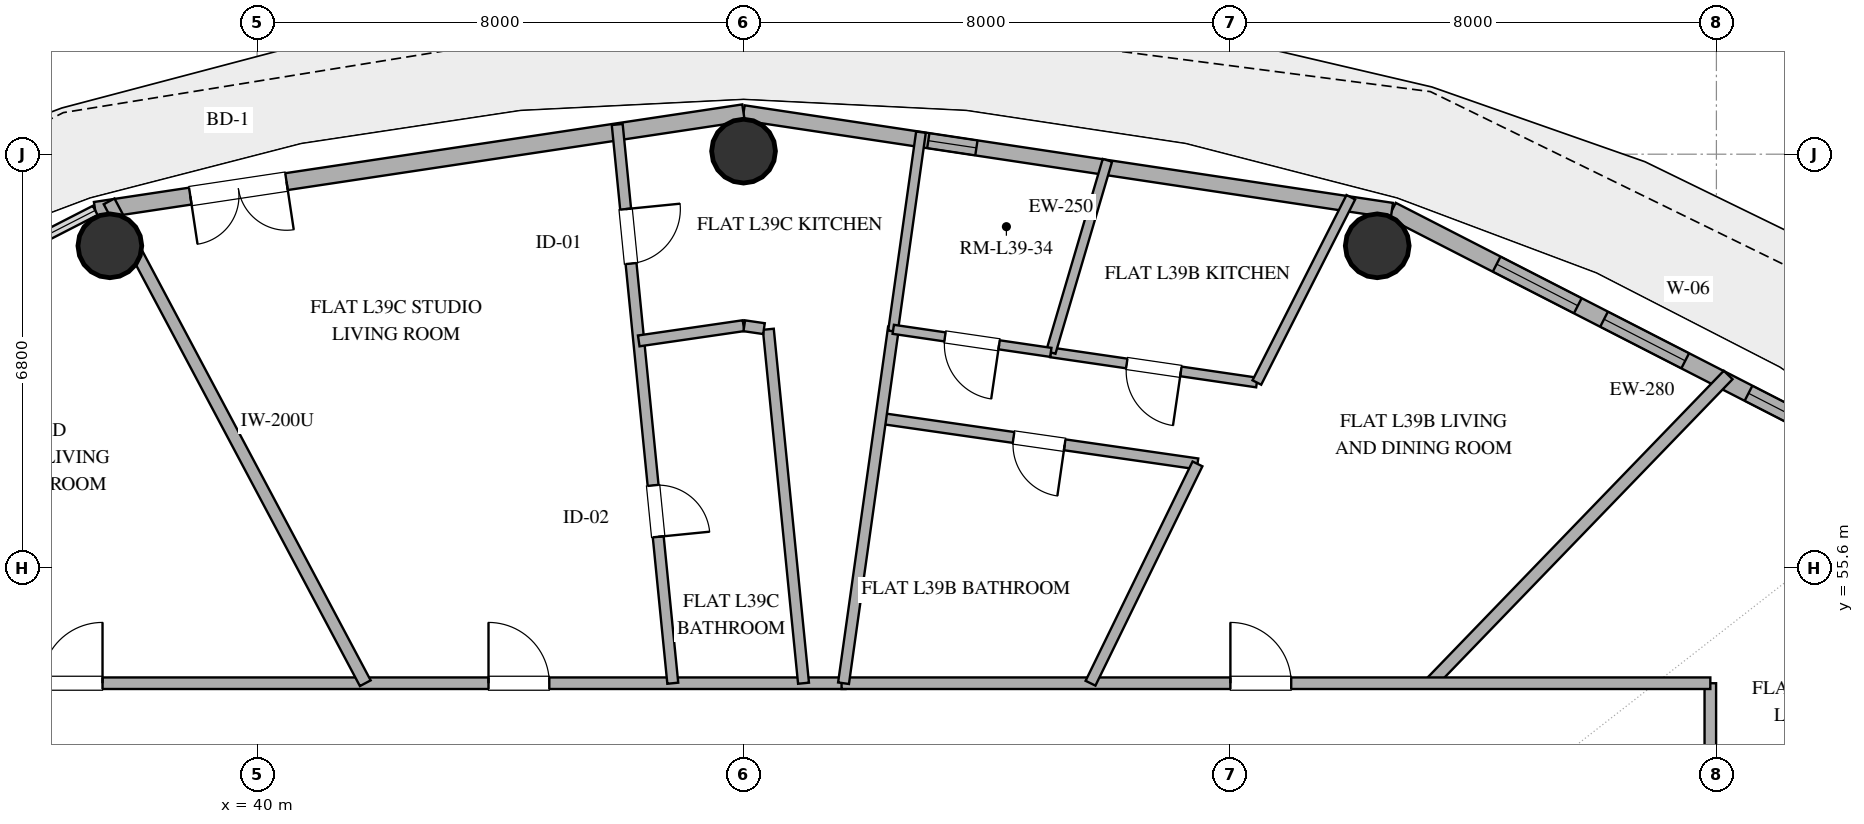
"""IFC4 building model, lengths in metres.
Left out: names, types, materials, properties, quantities, classifications, styles, units other than length and angle.
Written with IfcOpenShell. Run it as: python <this file> out.ifc"""

import sys

from ifc_helpers import new_model, si_unit, direction, frame, frame_2d, origin, origin_2d, place, context, subcontext, project, spatial, rectangle, hollow_circle, extrude, element, fill, save


model = new_model("IFC4")
c1 = context("Model", 3, precision=1e-05, world=origin(), true_north=direction((0.0, 1.0)))
c2 = subcontext(c1, "Body", "Model", "MODEL_VIEW")
j1 = project(units=[si_unit("LENGTHUNIT", "METRE"), si_unit("PLANEANGLEUNIT", "RADIAN")], contexts=[c1])
p1 = place(None, origin())
s1 = spatial("IfcSite", under=j1, at=p1, CompositionType="ELEMENT")
p2 = place(p1, origin())
s2 = spatial("IfcBuilding", under=s1, at=p2, CompositionType="ELEMENT")
p3 = place(p2, frame((0.0, 0.0, 157.8)))
s3 = spatial("IfcBuildingStorey", under=s2, at=p3, CompositionType="ELEMENT", Elevation=157.8)
for number, where, z_axis, x_axis in (
    (1, (58.422, 60.893, 0.0), (0.0, 0.0, 1.0), (1.0, 0.0, 0.0)),
    (2, (48.0, 62.45, 0.0), (0.0, 0.0, 1.0), (1.0, 0.0, 0.0)),
    (3, (37.578, 60.893, 0.0), (0.0, 0.0, 1.0), (1.0, 0.0, 0.0)),
):
    element("IfcColumn", number, at=place(p3, frame(where, z_axis=z_axis, x_axis=x_axis)), inside=s3, PredefinedType="COLUMN", context=c2, shape_type="SweptSolid", body=[
        extrude(hollow_circle(Radius=0.525, WallThickness=0.028, at=origin_2d()), origin(), (0.0, 0.0, 1.0), 3.38),
    ])
p4 = place(p3, frame((67.576, 56.906, 0.0), z_axis=(0.0, 0.0, 1.0), x_axis=(-0.889872523182, 0.456209263919, 0.0)))
e4 = element("IfcWall", 4, at=p4, inside=s3, PredefinedType="SOLIDWALL", context=c2, shape_type="SweptSolid", body=[
    extrude(rectangle(XDim=10.016, YDim=0.28, at=frame_2d((5.008, 0.0))), origin(), (0.0, 0.0, 1.0), 3.38),
])
p5 = place(p4, frame((1.775, 0.0, 0.85)))
e5 = element("IfcOpeningElement", 5, at=p5, cuts=e4, PredefinedType="OPENING", context=c2, shape_type="SweptSolid", body=[
    extrude(rectangle(XDim=1.65, YDim=2.0, at=frame_2d((0.825, 1.0))), frame((0.0, 0.15, 0.0), z_axis=(0.0, -1.0, 0.0), x_axis=(1.0, 0.0, 0.0)), (0.0, 0.0, 1.0), 0.3),
])
p6 = place(p4, frame((4.595, 0.0, 0.85)))
e6 = element("IfcOpeningElement", 6, at=p6, cuts=e4, PredefinedType="OPENING", context=c2, shape_type="SweptSolid", body=[
    extrude(rectangle(XDim=1.5, YDim=2.0, at=frame_2d((0.75, 1.0))), frame((0.0, 0.15, 0.0), z_axis=(0.0, -1.0, 0.0), x_axis=(1.0, 0.0, 0.0)), (0.0, 0.0, 1.0), 0.3),
])
p7 = place(p4, frame((6.58, 0.0, 0.85)))
e7 = element("IfcOpeningElement", 7, at=p7, cuts=e4, PredefinedType="OPENING", context=c2, shape_type="SweptSolid", body=[
    extrude(rectangle(XDim=1.5, YDim=2.0, at=frame_2d((0.75, 1.0))), frame((0.0, 0.15, 0.0), z_axis=(0.0, -1.0, 0.0), x_axis=(1.0, 0.0, 0.0)), (0.0, 0.0, 1.0), 0.3),
])
p8 = place(p3, frame((58.663, 61.475, 0.0), z_axis=(0.0, 0.0, 1.0), x_axis=(-0.988863993413, 0.148822049884, 0.0)))
e8 = element("IfcWall", 8, at=p8, inside=s3, PredefinedType="SOLIDWALL", context=c2, shape_type="SweptSolid", body=[
    extrude(rectangle(XDim=10.783, YDim=0.25, at=frame_2d((5.392, 0.0))), origin(), (0.0, 0.0, 1.0), 3.38),
])
p9 = place(p8, frame((6.91, 0.0, 1.54)))
e9 = element("IfcOpeningElement", 9, at=p9, cuts=e8, PredefinedType="OPENING", context=c2, shape_type="SweptSolid", body=[
    extrude(rectangle(XDim=0.8, YDim=1.0, at=frame_2d((0.4, 0.5))), frame((0.0, 0.135, 0.0), z_axis=(0.0, -1.0, 0.0), x_axis=(1.0, 0.0, 0.0)), (0.0, 0.0, 1.0), 0.27),
])
p10 = place(p3, frame((48.0, 63.08, 0.0), z_axis=(0.0, 0.0, 1.0), x_axis=(-0.988863993413, -0.148822049884, 0.0)))
e10 = element("IfcWall", 10, at=p10, inside=s3, PredefinedType="SOLIDWALL", context=c2, shape_type="SweptSolid", body=[
    extrude(rectangle(XDim=10.783, YDim=0.28, at=frame_2d((5.392, 0.0))), origin(), (0.0, 0.0, 1.0), 3.38),
])
p11 = place(p10, frame((7.601, 0.0, 0.0)))
e11 = element("IfcOpeningElement", 11, at=p11, cuts=e10, PredefinedType="OPENING", context=c2, shape_type="SweptSolid", body=[
    extrude(rectangle(XDim=1.6, YDim=2.25, at=frame_2d((0.8, 1.125))), frame((0.0, 0.15, 0.0), z_axis=(0.0, -1.0, 0.0), x_axis=(1.0, 0.0, 0.0)), (0.0, 0.0, 1.0), 0.3),
])
p12 = place(p3, frame((32.1, 53.7, 0.0), z_axis=(0.0, 0.0, 1.0), x_axis=(1.0, 0.0, 0.0)))
e12 = element("IfcWall", 12, at=p12, inside=s3, PredefinedType="PARTITIONING", context=c2, shape_type="SweptSolid", body=[
    extrude(rectangle(XDim=17.576, YDim=0.19, at=frame_2d((8.788, 0.0))), origin(), (0.0, 0.0, 1.0), 2.74),
])
p13 = place(p12, frame((4.358, 0.0, 0.0)))
e13 = element("IfcOpeningElement", 13, at=p13, cuts=e12, PredefinedType="OPENING", context=c2, shape_type="SweptSolid", body=[
    extrude(rectangle(XDim=1.0, YDim=2.2, at=frame_2d((0.5, 1.1))), frame((0.0, 0.105, 0.0), z_axis=(0.0, -1.0, 0.0), x_axis=(1.0, 0.0, 0.0)), (0.0, 0.0, 1.0), 0.21),
])
p14 = place(p12, frame((11.706, 0.0, 0.0)))
e14 = element("IfcOpeningElement", 14, at=p14, cuts=e12, PredefinedType="OPENING", context=c2, shape_type="SweptSolid", body=[
    extrude(rectangle(XDim=1.0, YDim=2.2, at=frame_2d((0.5, 1.1))), frame((0.0, 0.105, 0.0), z_axis=(0.0, -1.0, 0.0), x_axis=(1.0, 0.0, 0.0)), (0.0, 0.0, 1.0), 0.21),
])
p15 = place(p3, frame((37.566, 61.624, 0.0), z_axis=(0.0, 0.0, 1.0), x_axis=(0.469466796814, -0.882950126955, 0.0)))
e15 = element("IfcWall", 15, at=p15, inside=s3, PredefinedType="PARTITIONING", context=c2, shape_type="SweptSolid", body=[
    extrude(rectangle(XDim=8.975, YDim=0.2, at=frame_2d((4.487, 0.0))), origin(), (0.0, 0.0, 1.0), 2.74),
])
p16 = place(p3, frame((64.194, 58.769, 0.0), z_axis=(0.0, 0.0, 1.0), x_axis=(-0.694647685064, -0.719350118952, 0.0)))
e16 = element("IfcWall", 16, at=p16, inside=s3, PredefinedType="PARTITIONING", context=c2, shape_type="SweptSolid", body=[
    extrude(rectangle(XDim=7.047, YDim=0.2, at=frame_2d((3.523, 0.0))), origin(), (0.0, 0.0, 1.0), 2.74),
])
p17 = place(p3, frame((63.9, 53.7, 0.0), z_axis=(0.0, 0.0, 1.0), x_axis=(0.0, -1.0, 0.0)))
e17 = element("IfcWall", 17, at=p17, inside=s3, PredefinedType="PARTITIONING", context=c2, shape_type="SweptSolid", body=[
    extrude(rectangle(XDim=10.62, YDim=0.19, at=frame_2d((5.31, 0.0))), origin(), (0.0, 0.0, 1.0), 2.74),
])
p18 = place(p17, frame((2.48, 0.0, 0.0)))
e18 = element("IfcOpeningElement", 18, at=p18, cuts=e17, PredefinedType="OPENING", context=c2, shape_type="SweptSolid", body=[
    extrude(rectangle(XDim=1.0, YDim=2.2, at=frame_2d((0.5, 1.1))), frame((0.0, 0.105, 0.0), z_axis=(0.0, -1.0, 0.0), x_axis=(1.0, 0.0, 0.0)), (0.0, 0.0, 1.0), 0.21),
])
p19 = place(p3, frame((48.407, 59.521, 0.0), z_axis=(0.0, 0.0, 1.0), x_axis=(0.098958231484, -0.995091587956, 0.0)))
e19 = element("IfcWall", 19, at=p19, inside=s3, PredefinedType="PLUMBINGWALL", context=c2, shape_type="SweptSolid", body=[
    extrude(rectangle(XDim=5.85, YDim=0.18, at=frame_2d((2.925, 0.0))), origin(), (0.0, 0.0, 1.0), 2.74),
])
p20 = place(p3, frame((45.922, 62.888, 0.0), z_axis=(0.0, 0.0, 1.0), x_axis=(0.098964435759, -0.995090970944, 0.0)))
e20 = element("IfcWall", 20, at=p20, inside=s3, PredefinedType="PLUMBINGWALL", context=c2, shape_type="SweptSolid", body=[
    extrude(rectangle(XDim=9.234, YDim=0.18, at=frame_2d((4.617, 0.0))), origin(), (0.0, 0.0, 1.0), 2.74),
])
p21 = place(p20, frame((5.964, 0.0, 0.0)))
e21 = element("IfcOpeningElement", 21, at=p21, cuts=e20, PredefinedType="OPENING", context=c2, shape_type="SweptSolid", body=[
    extrude(rectangle(XDim=0.85, YDim=2.1, at=frame_2d((0.425, 1.05))), frame((0.0, 0.1, 0.0), z_axis=(0.0, -1.0, 0.0), x_axis=(1.0, 0.0, 0.0)), (0.0, 0.0, 1.0), 0.2),
])
p22 = place(p20, frame((1.398, 0.0, 0.0)))
e22 = element("IfcOpeningElement", 22, at=p22, cuts=e20, PredefinedType="OPENING", context=c2, shape_type="SweptSolid", body=[
    extrude(rectangle(XDim=0.9, YDim=2.1, at=frame_2d((0.45, 1.05))), frame((0.0, 0.1, 0.0), z_axis=(0.0, -1.0, 0.0), x_axis=(1.0, 0.0, 0.0)), (0.0, 0.0, 1.0), 0.2),
])
p23 = place(p3, frame((49.612, 53.7, 0.0), z_axis=(0.0, 0.0, 1.0), x_axis=(1.0, 0.0, 0.0)))
e23 = element("IfcWall", 23, at=p23, inside=s3, PredefinedType="PARTITIONING", context=c2, shape_type="SweptSolid", body=[
    extrude(rectangle(XDim=14.288, YDim=0.19, at=frame_2d((7.144, 0.0))), origin(), (0.0, 0.0, 1.0), 2.74),
])
p24 = place(p23, frame((6.395, 0.0, 0.0)))
e24 = element("IfcOpeningElement", 24, at=p24, cuts=e23, PredefinedType="OPENING", context=c2, shape_type="SweptSolid", body=[
    extrude(rectangle(XDim=1.0, YDim=2.2, at=frame_2d((0.5, 1.1))), frame((0.0, 0.105, 0.0), z_axis=(0.0, -1.0, 0.0), x_axis=(1.0, 0.0, 0.0)), (0.0, 0.0, 1.0), 0.21),
])
p25 = place(p3, frame((55.466, 57.307, 0.0), z_axis=(0.0, 0.0, 1.0), x_axis=(-0.989825713309, 0.142285126674, 0.0)))
e25 = element("IfcWall", 25, at=p25, inside=s3, PredefinedType="PLUMBINGWALL", context=c2, shape_type="SweptSolid", body=[
    extrude(rectangle(XDim=5.262, YDim=0.18, at=frame_2d((2.631, 0.0))), origin(), (0.0, 0.0, 1.0), 2.74),
])
p26 = place(p25, frame((2.206, 0.0, 0.0)))
e26 = element("IfcOpeningElement", 26, at=p26, cuts=e25, PredefinedType="OPENING", context=c2, shape_type="SweptSolid", body=[
    extrude(rectangle(XDim=0.85, YDim=2.1, at=frame_2d((0.425, 1.05))), frame((0.0, 0.1, 0.0), z_axis=(0.0, -1.0, 0.0), x_axis=(1.0, 0.0, 0.0)), (0.0, 0.0, 1.0), 0.2),
])
p27 = place(p3, frame((50.467, 59.552, 0.0), z_axis=(0.0, 0.0, 1.0), x_axis=(-0.139194058732, -0.990265123093, 0.0)))
e27 = element("IfcWall", 27, at=p27, inside=s3, PredefinedType="PLUMBINGWALL", context=c2, shape_type="SweptSolid", body=[
    extrude(rectangle(XDim=5.909, YDim=0.18, at=frame_2d((2.955, 0.0))), origin(), (0.0, 0.0, 1.0), 2.74),
])
p28 = place(p3, frame((53.707, 53.7, 0.0), z_axis=(0.0, 0.0, 1.0), x_axis=(0.438333733087, 0.898812293217, 0.0)))
e28 = element("IfcWall", 28, at=p28, inside=s3, PredefinedType="PLUMBINGWALL", context=c2, shape_type="SweptSolid", body=[
    extrude(rectangle(XDim=4.013, YDim=0.18, at=frame_2d((2.006, 0.0))), origin(), (0.0, 0.0, 1.0), 2.74),
])
p29 = place(p3, frame((56.442, 58.645, 0.0), z_axis=(0.0, 0.0, 1.0), x_axis=(-0.989476501308, 0.144693653483, 0.0)))
e29 = element("IfcWall", 29, at=p29, inside=s3, PredefinedType="PLUMBINGWALL", context=c2, shape_type="SweptSolid", body=[
    extrude(rectangle(XDim=3.425, YDim=0.16, at=frame_2d((1.713, 0.0))), origin(), (0.0, 0.0, 1.0), 2.74),
])
p30 = place(p29, frame((1.263, 0.0, 0.0)))
e30 = element("IfcOpeningElement", 30, at=p30, cuts=e29, PredefinedType="OPENING", context=c2, shape_type="SweptSolid", body=[
    extrude(rectangle(XDim=0.9, YDim=2.1, at=frame_2d((0.45, 1.05))), frame((0.0, 0.09, 0.0), z_axis=(0.0, -1.0, 0.0), x_axis=(1.0, 0.0, 0.0)), (0.0, 0.0, 1.0), 0.18),
])
p31 = place(p3, frame((57.988, 61.692, 0.0), z_axis=(0.0, 0.0, 1.0), x_axis=(-0.452408261564, -0.89181094682, 0.0)))
e31 = element("IfcWall", 31, at=p31, inside=s3, PredefinedType="PLUMBINGWALL", context=c2, shape_type="SweptSolid", body=[
    extrude(rectangle(XDim=3.417, YDim=0.16, at=frame_2d((1.708, 0.0))), origin(), (0.0, 0.0, 1.0), 2.74),
])
p32 = place(p3, frame((50.918, 62.762, 0.0), z_axis=(0.0, 0.0, 1.0), x_axis=(-0.139198258336, -0.990264532777, 0.0)))
e32 = element("IfcWall", 32, at=p32, inside=s3, PredefinedType="PLUMBINGWALL", context=c2, shape_type="SweptSolid", body=[
    extrude(rectangle(XDim=3.306, YDim=0.16, at=frame_2d((1.653, 0.0))), origin(), (0.0, 0.0, 1.0), 2.74),
])
p33 = place(p3, frame((53.053, 59.141, 0.0), z_axis=(0.0, 0.0, 1.0), x_axis=(0.282828521875, 0.959170489128, 0.0)))
e33 = element("IfcWall", 33, at=p33, inside=s3, PredefinedType="PLUMBINGWALL", context=c2, shape_type="SweptSolid", body=[
    extrude(rectangle(XDim=3.293, YDim=0.16, at=frame_2d((1.646, 0.0))), origin(), (0.0, 0.0, 1.0), 2.74),
])
p34 = place(p3, frame((53.053, 59.141, 0.0), z_axis=(0.0, 0.0, 1.0), x_axis=(-0.989458783037, 0.144814766757, 0.0)))
e34 = element("IfcWall", 34, at=p34, inside=s3, PredefinedType="PARTITIONING", context=c2, shape_type="SweptSolid", body=[
    extrude(rectangle(XDim=2.618, YDim=0.15, at=frame_2d((1.309, 0.0))), origin(), (0.0, 0.0, 1.0), 2.74),
])
p35 = place(p34, frame((0.859, 0.0, 0.0)))
e35 = element("IfcOpeningElement", 35, at=p35, cuts=e34, PredefinedType="OPENING", context=c2, shape_type="SweptSolid", body=[
    extrude(rectangle(XDim=0.9, YDim=2.1, at=frame_2d((0.45, 1.05))), frame((0.0, 0.085, 0.0), z_axis=(0.0, -1.0, 0.0), x_axis=(1.0, 0.0, 0.0)), (0.0, 0.0, 1.0), 0.17),
])
p36 = place(p3, frame((46.276, 59.33, 0.0), z_axis=(0.0, 0.0, 1.0), x_axis=(0.989604582355, 0.143815056869, 0.0)))
e36 = element("IfcWall", 36, at=p36, inside=s3, PredefinedType="PLUMBINGWALL", context=c2, shape_type="SweptSolid", body=[
    extrude(rectangle(XDim=1.742, YDim=0.18, at=frame_2d((0.871, 0.0))), origin(), (0.0, 0.0, 1.0), 2.74),
])
p37 = place(p3, frame((48.012, 59.578, 0.0), z_axis=(0.0, 0.0, 1.0), x_axis=(0.989603801202, -0.143820431952, 0.0)))
e37 = element("IfcWall", 37, at=p37, inside=s3, PredefinedType="PLUMBINGWALL", context=c2, shape_type="SweptSolid", body=[
    extrude(rectangle(XDim=0.328, YDim=0.18, at=frame_2d((0.164, 0.0))), origin(), (0.0, 0.0, 1.0), 2.74),
])
p38 = place(p5, origin())
e38 = element("IfcWindow", 38, at=p38, inside=s3, PartitioningType="SINGLE_PANEL", PredefinedType="WINDOW", context=c2, shape_type="SweptSolid", body=[
    extrude(rectangle(XDim=1.65, YDim=2.0, at=frame_2d((0.825, 1.0))), frame((0.0, 0.03, 0.0), z_axis=(0.0, -1.0, 0.0), x_axis=(1.0, 0.0, 0.0)), (0.0, 0.0, 1.0), 0.06),
])
fill(e5, e38)
p39 = place(p6, origin())
e39 = element("IfcWindow", 39, at=p39, inside=s3, PartitioningType="SINGLE_PANEL", PredefinedType="WINDOW", context=c2, shape_type="SweptSolid", body=[
    extrude(rectangle(XDim=1.5, YDim=2.0, at=frame_2d((0.75, 1.0))), frame((0.0, 0.03, 0.0), z_axis=(0.0, -1.0, 0.0), x_axis=(1.0, 0.0, 0.0)), (0.0, 0.0, 1.0), 0.06),
])
fill(e6, e39)
p40 = place(p7, origin())
e40 = element("IfcWindow", 40, at=p40, inside=s3, PartitioningType="SINGLE_PANEL", PredefinedType="WINDOW", context=c2, shape_type="SweptSolid", body=[
    extrude(rectangle(XDim=1.5, YDim=2.0, at=frame_2d((0.75, 1.0))), frame((0.0, 0.03, 0.0), z_axis=(0.0, -1.0, 0.0), x_axis=(1.0, 0.0, 0.0)), (0.0, 0.0, 1.0), 0.06),
])
fill(e7, e40)
p41 = place(p11, origin())
e41 = element("IfcDoor", 41, at=p41, inside=s3, OperationType="DOUBLE_DOOR_SINGLE_SWING", PredefinedType="DOOR", context=c2, shape_type="SweptSolid", body=[
    extrude(rectangle(XDim=1.6, YDim=2.25, at=frame_2d((0.8, 1.125))), frame((0.0, 0.025, 0.0), z_axis=(0.0, -1.0, 0.0), x_axis=(1.0, 0.0, 0.0)), (0.0, 0.0, 1.0), 0.05),
])
fill(e11, e41)
p42 = place(p9, origin())
e42 = element("IfcWindow", 42, at=p42, inside=s3, PartitioningType="SINGLE_PANEL", PredefinedType="WINDOW", context=c2, shape_type="SweptSolid", body=[
    extrude(rectangle(XDim=0.8, YDim=1.0, at=frame_2d((0.4, 0.5))), frame((0.0, 0.03, 0.0), z_axis=(0.0, -1.0, 0.0), x_axis=(1.0, 0.0, 0.0)), (0.0, 0.0, 1.0), 0.06),
])
fill(e9, e42)
p43 = place(p13, origin())
e43 = element("IfcDoor", 43, at=p43, inside=s3, OperationType="SINGLE_SWING_RIGHT", PredefinedType="DOOR", context=c2, shape_type="SweptSolid", body=[
    extrude(rectangle(XDim=1.0, YDim=2.2, at=frame_2d((0.5, 1.1))), frame((0.0, 0.025, 0.0), z_axis=(0.0, -1.0, 0.0), x_axis=(1.0, 0.0, 0.0)), (0.0, 0.0, 1.0), 0.05),
])
fill(e13, e43)
p44 = place(p14, origin())
e44 = element("IfcDoor", 44, at=p44, inside=s3, OperationType="SINGLE_SWING_LEFT", PredefinedType="DOOR", context=c2, shape_type="SweptSolid", body=[
    extrude(rectangle(XDim=1.0, YDim=2.2, at=frame_2d((0.5, 1.1))), frame((0.0, 0.025, 0.0), z_axis=(0.0, -1.0, 0.0), x_axis=(1.0, 0.0, 0.0)), (0.0, 0.0, 1.0), 0.05),
])
fill(e14, e44)
p45 = place(p21, origin())
e45 = element("IfcDoor", 45, at=p45, inside=s3, OperationType="SINGLE_SWING_RIGHT", PredefinedType="DOOR", context=c2, shape_type="SweptSolid", body=[
    extrude(rectangle(XDim=0.85, YDim=2.1, at=frame_2d((0.425, 1.05))), frame((0.0, 0.025, 0.0), z_axis=(0.0, -1.0, 0.0), x_axis=(1.0, 0.0, 0.0)), (0.0, 0.0, 1.0), 0.05),
])
fill(e21, e45)
p46 = place(p22, origin())
e46 = element("IfcDoor", 46, at=p46, inside=s3, OperationType="SINGLE_SWING_LEFT", PredefinedType="DOOR", context=c2, shape_type="SweptSolid", body=[
    extrude(rectangle(XDim=0.9, YDim=2.1, at=frame_2d((0.45, 1.05))), frame((0.0, 0.025, 0.0), z_axis=(0.0, -1.0, 0.0), x_axis=(1.0, 0.0, 0.0)), (0.0, 0.0, 1.0), 0.05),
])
fill(e22, e46)
p47 = place(p24, origin())
e47 = element("IfcDoor", 47, at=p47, inside=s3, OperationType="SINGLE_SWING_LEFT", PredefinedType="DOOR", context=c2, shape_type="SweptSolid", body=[
    extrude(rectangle(XDim=1.0, YDim=2.2, at=frame_2d((0.5, 1.1))), frame((0.0, 0.025, 0.0), z_axis=(0.0, -1.0, 0.0), x_axis=(1.0, 0.0, 0.0)), (0.0, 0.0, 1.0), 0.05),
])
fill(e24, e47)
p48 = place(p26, origin())
e48 = element("IfcDoor", 48, at=p48, inside=s3, OperationType="SINGLE_SWING_LEFT", PredefinedType="DOOR", context=c2, shape_type="SweptSolid", body=[
    extrude(rectangle(XDim=0.85, YDim=2.1, at=frame_2d((0.425, 1.05))), frame((0.0, 0.025, 0.0), z_axis=(0.0, -1.0, 0.0), x_axis=(1.0, 0.0, 0.0)), (0.0, 0.0, 1.0), 0.05),
])
fill(e26, e48)
p49 = place(p30, origin())
e49 = element("IfcDoor", 49, at=p49, inside=s3, OperationType="SINGLE_SWING_LEFT", PredefinedType="DOOR", context=c2, shape_type="SweptSolid", body=[
    extrude(rectangle(XDim=0.9, YDim=2.1, at=frame_2d((0.45, 1.05))), frame((0.0, 0.025, 0.0), z_axis=(0.0, -1.0, 0.0), x_axis=(1.0, 0.0, 0.0)), (0.0, 0.0, 1.0), 0.05),
])
fill(e30, e49)
p50 = place(p35, origin())
e50 = element("IfcDoor", 50, at=p50, inside=s3, OperationType="SINGLE_SWING_LEFT", PredefinedType="DOOR", context=c2, shape_type="SweptSolid", body=[
    extrude(rectangle(XDim=0.9, YDim=2.1, at=frame_2d((0.45, 1.05))), frame((0.0, 0.025, 0.0), z_axis=(0.0, -1.0, 0.0), x_axis=(1.0, 0.0, 0.0)), (0.0, 0.0, 1.0), 0.05),
])
fill(e35, e50)
save(model, sys.argv[1])
